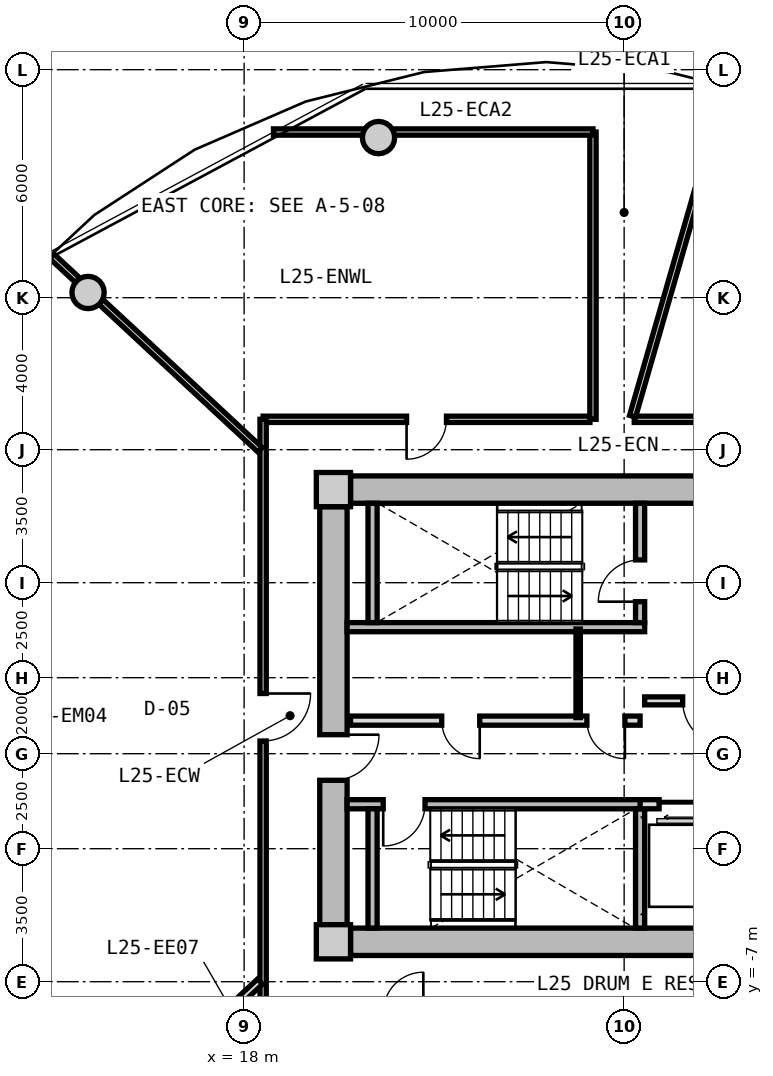
"""IFC4 building model, lengths in metres.
Left out: names, types, materials, properties, quantities, classifications, styles, units other than length and angle.
Written with IfcOpenShell. Run it as: python <this file> out.ifc"""

import sys

from ifc_helpers import new_model, si_unit, direction, frame, frame_2d, origin, origin_2d, place, context, subcontext, project, spatial, rectangle, circle, extrude, source, transform, mapped, element, fill, save


model = new_model("IFC4")
c1 = context("Model", 3, precision=1e-05, world=origin(), true_north=direction((0.0, 1.0)))
c2 = subcontext(c1, "Body", "Model", "MODEL_VIEW")
j1 = project(units=[si_unit("LENGTHUNIT", "METRE"), si_unit("PLANEANGLEUNIT", "RADIAN")], contexts=[c1])
p1 = place(None, origin())
s1 = spatial("IfcSite", under=j1, at=p1, CompositionType="ELEMENT")
p2 = place(p1, origin())
s2 = spatial("IfcBuilding", under=s1, at=p2, CompositionType="ELEMENT")
p3 = place(p2, frame((0.0, 0.0, 84.05)))
s3 = spatial("IfcBuildingStorey", under=s2, at=p3, CompositionType="ELEMENT", Elevation=84.05)
m1 = source(origin(), c2, "Body", "SweptSolid", [
    extrude(rectangle(XDim=0.9, YDim=0.9, at=origin_2d()), origin(), (0.0, 0.0, 1.0), 3.05),
])
for number, where, z_axis, x_axis in (
    (1, (20.35, -5.95, 0.0), (0.0, 0.0, 1.0), (1.0, 0.0, 0.0)),
    (2, (20.35, 5.95, 0.0), (0.0, 0.0, 1.0), (1.0, 0.0, 0.0)),
):
    element("IfcColumn", number, at=place(p3, frame(where, z_axis=z_axis, x_axis=x_axis)), inside=s3, PredefinedType="COLUMN", context=c2, shape_type="MappedRepresentation", body=[
        mapped(m1, transform((0.0, 0.0, 0.0), x_axis=(1.0, 0.0, 0.0), y_axis=(0.0, 1.0, 0.0), z_axis=(0.0, 0.0, 1.0), scale=1.0)),
    ])
m2 = source(origin(), c2, "Body", "SweptSolid", [
    extrude(rectangle(XDim=14.4, YDim=0.72, at=frame_2d((7.2, 0.0))), origin(), (0.0, 0.0, 1.0), 2.79),
])
for number, where, z_axis, x_axis in (
    (3, (20.8, 5.95, 0.0), (0.0, 0.0, 1.0), (1.0, 0.0, 0.0)),
    (4, (35.2, -5.95, 0.0), (0.0, 0.0, 1.0), (-1.0, 0.0, 0.0)),
):
    element("IfcWall", number, at=place(p3, frame(where, z_axis=z_axis, x_axis=x_axis)), inside=s3, PredefinedType="SHEAR", context=c2, shape_type="MappedRepresentation", body=[
        mapped(m2, transform((0.0, 0.0, 0.0), x_axis=(1.0, 0.0, 0.0), y_axis=(0.0, 1.0, 0.0), z_axis=(0.0, 0.0, 1.0), scale=1.0)),
    ])
m3 = source(origin(), c2, "Body", "SweptSolid", [
    extrude(rectangle(XDim=11.0, YDim=0.72, at=frame_2d((5.5, 0.0))), origin(), (0.0, 0.0, 1.0), 2.79),
])
p4 = place(p3, frame((20.35, -5.5, 0.0), z_axis=(0.0, 0.0, 1.0), x_axis=(0.0, 1.0, 0.0)))
e5 = element("IfcWall", 5, at=p4, inside=s3, PredefinedType="SHEAR", context=c2, shape_type="MappedRepresentation", body=[
    mapped(m3, transform((0.0, 0.0, 0.0), x_axis=(1.0, 0.0, 0.0), y_axis=(0.0, 1.0, 0.0), z_axis=(0.0, 0.0, 1.0), scale=1.0)),
])
p5 = place(p4, frame((3.8, 0.0, 0.0)))
e6 = element("IfcOpeningElement", 6, at=p5, cuts=e5, PredefinedType="OPENING", context=c2, shape_type="SweptSolid", body=[
    extrude(rectangle(XDim=1.2, YDim=2.15, at=frame_2d((0.6, 1.075))), frame((0.0, 0.37, 0.0), z_axis=(0.0, -1.0, 0.0), x_axis=(1.0, 0.0, 0.0)), (0.0, 0.0, 1.0), 0.74),
])
m4 = source(origin(), c2, "Body", "SweptSolid", [
    extrude(circle(Radius=0.425, at=origin_2d()), origin(), (0.0, 0.0, 1.0), 3.05),
])
for number, where, z_axis, x_axis in (
    (7, (21.537, 15.213, 0.0), (0.0, 0.0, 1.0), (1.0, 0.0, 0.0)),
    (8, (13.894, 11.137, 0.0), (0.0, 0.0, 1.0), (1.0, 0.0, 0.0)),
):
    element("IfcColumn", number, at=place(p3, frame(where, z_axis=z_axis, x_axis=x_axis)), inside=s3, PredefinedType="COLUMN", context=c2, shape_type="MappedRepresentation", body=[
        mapped(m4, transform((0.0, 0.0, 0.0), x_axis=(1.0, 0.0, 0.0), y_axis=(0.0, 1.0, 0.0), z_axis=(0.0, 0.0, 1.0), scale=1.0)),
    ])
m5 = source(origin(), c2, "Body", "SweptSolid", [
    extrude(rectangle(XDim=7.83, YDim=0.24, at=frame_2d((3.915, 0.0))), origin(), (0.0, 0.0, 1.0), 2.79),
])
p6 = place(p3, frame((20.71, 2.33, 0.0), z_axis=(0.0, 0.0, 1.0), x_axis=(1.0, 0.0, 0.0)))
e9 = element("IfcWall", 9, at=p6, inside=s3, PredefinedType="PARTITIONING", context=c2, shape_type="MappedRepresentation", body=[
    mapped(m5, transform((0.0, 0.0, 0.0), x_axis=(1.0, 0.0, 0.0), y_axis=(0.0, 1.0, 0.0), z_axis=(0.0, 0.0, 1.0), scale=1.0)),
])
m6 = source(origin(), c2, "Body", "SweptSolid", [
    extrude(rectangle(XDim=3.14, YDim=0.24, at=frame_2d((1.57, 0.0))), origin(), (0.0, 0.0, 1.0), 2.79),
])
p7 = place(p3, frame((21.38, 2.45, 0.0), z_axis=(0.0, 0.0, 1.0), x_axis=(0.0, 1.0, 0.0)))
e10 = element("IfcWall", 10, at=p7, inside=s3, PredefinedType="PARTITIONING", context=c2, shape_type="MappedRepresentation", body=[
    mapped(m6, transform((0.0, 0.0, 0.0), x_axis=(1.0, 0.0, 0.0), y_axis=(0.0, 1.0, 0.0), z_axis=(0.0, 0.0, 1.0), scale=1.0)),
])
p8 = place(p3, frame((28.42, 2.45, 0.0), z_axis=(0.0, 0.0, 1.0), x_axis=(0.0, 1.0, 0.0)))
e11 = element("IfcWall", 11, at=p8, inside=s3, PredefinedType="PARTITIONING", context=c2, shape_type="MappedRepresentation", body=[
    mapped(m6, transform((0.0, 0.0, 0.0), x_axis=(1.0, 0.0, 0.0), y_axis=(0.0, 1.0, 0.0), z_axis=(0.0, 0.0, 1.0), scale=1.0)),
])
p9 = place(p8, frame((0.55, 0.0, 0.0)))
e12 = element("IfcOpeningElement", 12, at=p9, cuts=e11, PredefinedType="OPENING", context=c2, shape_type="SweptSolid", body=[
    extrude(rectangle(XDim=1.1, YDim=2.15, at=frame_2d((0.55, 1.075))), frame((0.0, 0.13, 0.0), z_axis=(0.0, -1.0, 0.0), x_axis=(1.0, 0.0, 0.0)), (0.0, 0.0, 1.0), 0.26),
])
p10 = place(p3, frame((20.71, -2.33, 0.0), z_axis=(0.0, 0.0, 1.0), x_axis=(1.0, 0.0, 0.0)))
e13 = element("IfcWall", 13, at=p10, inside=s3, PredefinedType="PARTITIONING", context=c2, shape_type="MappedRepresentation", body=[
    mapped(m5, transform((0.0, 0.0, 0.0), x_axis=(1.0, 0.0, 0.0), y_axis=(0.0, 1.0, 0.0), z_axis=(0.0, 0.0, 1.0), scale=1.0)),
])
p11 = place(p10, frame((0.95, 0.0, 0.0)))
e14 = element("IfcOpeningElement", 14, at=p11, cuts=e13, PredefinedType="OPENING", context=c2, shape_type="SweptSolid", body=[
    extrude(rectangle(XDim=1.1, YDim=2.15, at=frame_2d((0.55, 1.075))), frame((0.0, 0.13, 0.0), z_axis=(0.0, -1.0, 0.0), x_axis=(1.0, 0.0, 0.0)), (0.0, 0.0, 1.0), 0.26),
])
for number, where, z_axis, x_axis in (
    (15, (21.38, -5.59, 0.0), (0.0, 0.0, 1.0), (0.0, 1.0, 0.0)),
    (16, (28.42, -5.59, 0.0), (0.0, 0.0, 1.0), (0.0, 1.0, 0.0)),
):
    element("IfcWall", number, at=place(p3, frame(where, z_axis=z_axis, x_axis=x_axis)), inside=s3, PredefinedType="PARTITIONING", context=c2, shape_type="MappedRepresentation", body=[
        mapped(m6, transform((0.0, 0.0, 0.0), x_axis=(1.0, 0.0, 0.0), y_axis=(0.0, 1.0, 0.0), z_axis=(0.0, 0.0, 1.0), scale=1.0)),
    ])
m7 = source(origin(), c2, "Body", "SweptSolid", [
    extrude(rectangle(XDim=6.66, YDim=0.21, at=frame_2d((3.33, 0.0))), origin(), (0.0, 0.0, 1.0), 2.775),
])
p12 = place(p3, frame((28.54, 0.39, 0.0), z_axis=(0.0, 0.0, 1.0), x_axis=(1.0, 0.0, 0.0)))
e17 = element("IfcWall", 17, at=p12, inside=s3, PredefinedType="PARTITIONING", context=c2, shape_type="MappedRepresentation", body=[
    mapped(m7, transform((0.0, 0.0, 0.0), x_axis=(1.0, 0.0, 0.0), y_axis=(0.0, 1.0, 0.0), z_axis=(0.0, 0.0, 1.0), scale=1.0)),
])
p13 = place(p12, frame((1.0, 0.0, 0.0)))
e18 = element("IfcOpeningElement", 18, at=p13, cuts=e17, PredefinedType="OPENING", context=c2, shape_type="SweptSolid", body=[
    extrude(rectangle(XDim=1.2, YDim=2.15, at=frame_2d((0.6, 1.075))), frame((0.0, 0.115, 0.0), z_axis=(0.0, -1.0, 0.0), x_axis=(1.0, 0.0, 0.0)), (0.0, 0.0, 1.0), 0.23),
])
m8 = source(origin(), c2, "Body", "SweptSolid", [
    extrude(rectangle(XDim=7.62, YDim=0.24, at=frame_2d((3.81, 0.0))), origin(), (0.0, 0.0, 1.0), 2.775),
])
p14 = place(p3, frame((20.8, -0.13, 0.0), z_axis=(0.0, 0.0, 1.0), x_axis=(1.0, 0.0, 0.0)))
e19 = element("IfcWall", 19, at=p14, inside=s3, PredefinedType="PARTITIONING", context=c2, shape_type="MappedRepresentation", body=[
    mapped(m8, transform((0.0, 0.0, 0.0), x_axis=(1.0, 0.0, 0.0), y_axis=(0.0, 1.0, 0.0), z_axis=(0.0, 0.0, 1.0), scale=1.0)),
])
p15 = place(p14, frame((6.22, 0.0, 0.0)))
e20 = element("IfcOpeningElement", 20, at=p15, cuts=e19, PredefinedType="OPENING", context=c2, shape_type="SweptSolid", body=[
    extrude(rectangle(XDim=1.0, YDim=2.1, at=frame_2d((0.5, 1.05))), frame((0.0, 0.13, 0.0), z_axis=(0.0, -1.0, 0.0), x_axis=(1.0, 0.0, 0.0)), (0.0, 0.0, 1.0), 0.26),
])
p16 = place(p14, frame((2.4, 0.0, 0.0)))
e21 = element("IfcOpeningElement", 21, at=p16, cuts=e19, PredefinedType="OPENING", context=c2, shape_type="SweptSolid", body=[
    extrude(rectangle(XDim=1.0, YDim=2.1, at=frame_2d((0.5, 1.05))), frame((0.0, 0.13, 0.0), z_axis=(0.0, -1.0, 0.0), x_axis=(1.0, 0.0, 0.0)), (0.0, 0.0, 1.0), 0.26),
])
m9 = source(origin(), c2, "Body", "SweptSolid", [
    extrude(rectangle(XDim=2.33, YDim=0.115, at=frame_2d((1.165, 0.0))), origin(), (0.0, 0.0, 1.0), 2.775),
])
p17 = place(p3, frame((26.79, -0.05, 0.0), z_axis=(0.0, 0.0, 1.0), x_axis=(0.0, 1.0, 0.0)))
e22 = element("IfcWall", 22, at=p17, inside=s3, PredefinedType="PARTITIONING", context=c2, shape_type="MappedRepresentation", body=[
    mapped(m9, transform((0.0, 0.0, 0.0), x_axis=(1.0, 0.0, 0.0), y_axis=(0.0, 1.0, 0.0), z_axis=(0.0, 0.0, 1.0), scale=1.0)),
])
m10 = source(origin(), c2, "Body", "SweptSolid", [
    extrude(rectangle(XDim=4.13, YDim=0.24, at=frame_2d((2.065, 0.0))), origin(), (0.0, 0.0, 1.0), 2.775),
])
p18 = place(p3, frame((28.42, -2.33, 0.0), z_axis=(0.0, 0.0, 1.0), x_axis=(1.0, 0.0, 0.0)))
e23 = element("IfcWall", 23, at=p18, inside=s3, PredefinedType="PARTITIONING", context=c2, shape_type="MappedRepresentation", body=[
    mapped(m10, transform((0.0, 0.0, 0.0), x_axis=(1.0, 0.0, 0.0), y_axis=(0.0, 1.0, 0.0), z_axis=(0.0, 0.0, 1.0), scale=1.0)),
])
p19 = place(p18, frame((0.5, 0.0, 0.0)))
e24 = element("IfcOpeningElement", 24, at=p19, cuts=e23, PredefinedType="OPENING", context=c2, shape_type="SweptSolid", body=[
    extrude(rectangle(XDim=1.1, YDim=2.2, at=frame_2d((0.55, 1.1))), frame((0.0, 0.13, 0.0), z_axis=(0.0, -1.0, 0.0), x_axis=(1.0, 0.0, 0.0)), (0.0, 0.0, 1.0), 0.26),
])
m11 = source(origin(), c2, "Body", "SweptSolid", [
    extrude(rectangle(XDim=8.6, YDim=0.165, at=frame_2d((4.3, 0.0))), origin(), (0.0, 0.0, 1.0), 2.775),
])
p20 = place(p3, frame((18.5, 7.8, 0.0), z_axis=(0.0, 0.0, 1.0), x_axis=(1.0, 0.0, 0.0)))
e25 = element("IfcWall", 25, at=p20, inside=s3, PredefinedType="PARTITIONING", context=c2, shape_type="MappedRepresentation", body=[
    mapped(m11, transform((0.0, 0.0, 0.0), x_axis=(1.0, 0.0, 0.0), y_axis=(0.0, 1.0, 0.0), z_axis=(0.0, 0.0, 1.0), scale=1.0)),
])
p21 = place(p20, frame((3.775, 0.0, 0.0)))
e26 = element("IfcOpeningElement", 26, at=p21, cuts=e25, PredefinedType="OPENING", context=c2, shape_type="SweptSolid", body=[
    extrude(rectangle(XDim=1.05, YDim=2.15, at=frame_2d((0.525, 1.075))), frame((0.0, 0.093, 0.0), z_axis=(0.0, -1.0, 0.0), x_axis=(1.0, 0.0, 0.0)), (0.0, 0.0, 1.0), 0.185),
])
m12 = source(origin(), c2, "Body", "SweptSolid", [
    extrude(rectangle(XDim=9.234, YDim=0.165, at=frame_2d((4.617, 0.0))), origin(), (0.0, 0.0, 1.0), 2.775),
])
p22 = place(p3, frame((28.266, 7.8, 0.0), z_axis=(0.0, 0.0, 1.0), x_axis=(1.0, 0.0, 0.0)))
e27 = element("IfcWall", 27, at=p22, inside=s3, PredefinedType="PARTITIONING", context=c2, shape_type="MappedRepresentation", body=[
    mapped(m12, transform((0.0, 0.0, 0.0), x_axis=(1.0, 0.0, 0.0), y_axis=(0.0, 1.0, 0.0), z_axis=(0.0, 0.0, 1.0), scale=1.0)),
])
p23 = place(p22, frame((4.092, 0.0, 0.0)))
e28 = element("IfcOpeningElement", 28, at=p23, cuts=e27, PredefinedType="OPENING", context=c2, shape_type="SweptSolid", body=[
    extrude(rectangle(XDim=1.05, YDim=2.15, at=frame_2d((0.525, 1.075))), frame((0.0, 0.093, 0.0), z_axis=(0.0, -1.0, 0.0), x_axis=(1.0, 0.0, 0.0)), (0.0, 0.0, 1.0), 0.185),
])
m13 = source(origin(), c2, "Body", "SweptSolid", [
    extrude(rectangle(XDim=15.6, YDim=0.165, at=frame_2d((7.8, 0.0))), origin(), (0.0, 0.0, 1.0), 2.775),
])
p24 = place(p3, frame((18.5, -7.8, 0.0), z_axis=(0.0, 0.0, 1.0), x_axis=(0.0, 1.0, 0.0)))
e29 = element("IfcWall", 29, at=p24, inside=s3, PredefinedType="PARTITIONING", context=c2, shape_type="MappedRepresentation", body=[
    mapped(m13, transform((0.0, 0.0, 0.0), x_axis=(1.0, 0.0, 0.0), y_axis=(0.0, 1.0, 0.0), z_axis=(0.0, 0.0, 1.0), scale=1.0)),
])
p25 = place(p24, frame((7.134, 0.0, 0.0)))
e30 = element("IfcOpeningElement", 30, at=p25, cuts=e29, PredefinedType="OPENING", context=c2, shape_type="SweptSolid", body=[
    extrude(rectangle(XDim=1.25, YDim=2.2, at=frame_2d((0.625, 1.1))), frame((0.0, 0.093, 0.0), z_axis=(0.0, -1.0, 0.0), x_axis=(1.0, 0.0, 0.0)), (0.0, 0.0, 1.0), 0.185),
])
m14 = source(origin(), c2, "Body", "SweptSolid", [
    extrude(rectangle(XDim=8.989, YDim=0.165, at=frame_2d((4.495, 0.0))), origin(), (0.0, 0.0, 1.0), 2.275),
])
p26 = place(p3, frame((28.222, 7.88, 0.0), z_axis=(0.0, 0.0, 1.0), x_axis=(0.27702323008, 0.960863221274, 0.0)))
e31 = element("IfcWall", 31, at=p26, inside=s3, PredefinedType="PARTITIONING", context=c2, shape_type="MappedRepresentation", body=[
    mapped(m14, transform((0.0, 0.0, 0.0), x_axis=(1.0, 0.0, 0.0), y_axis=(0.0, 1.0, 0.0), z_axis=(0.0, 0.0, 1.0), scale=1.0)),
])
m15 = source(origin(), c2, "Body", "SweptSolid", [
    extrude(rectangle(XDim=7.482, YDim=0.165, at=frame_2d((3.741, 0.0))), origin(), (0.0, 0.0, 1.0), 2.275),
])
p27 = place(p3, frame((18.42, 6.998, 0.0), z_axis=(0.0, 0.0, 1.0), x_axis=(-0.732508698043, 0.680757671489, 0.0)))
e32 = element("IfcWall", 32, at=p27, inside=s3, PredefinedType="PARTITIONING", context=c2, shape_type="MappedRepresentation", body=[
    mapped(m15, transform((0.0, 0.0, 0.0), x_axis=(1.0, 0.0, 0.0), y_axis=(0.0, 1.0, 0.0), z_axis=(0.0, 0.0, 1.0), scale=1.0)),
])
m16 = source(origin(), c2, "Body", "SweptSolid", [
    extrude(rectangle(XDim=7.56, YDim=0.165, at=frame_2d((3.78, 0.0))), origin(), (0.0, 0.0, 1.0), 2.775),
])
p28 = place(p3, frame((27.18, 7.8, 0.0), z_axis=(0.0, 0.0, 1.0), x_axis=(0.0, 1.0, 0.0)))
e33 = element("IfcWall", 33, at=p28, inside=s3, PredefinedType="PARTITIONING", context=c2, shape_type="MappedRepresentation", body=[
    mapped(m16, transform((0.0, 0.0, 0.0), x_axis=(1.0, 0.0, 0.0), y_axis=(0.0, 1.0, 0.0), z_axis=(0.0, 0.0, 1.0), scale=1.0)),
])
m17 = source(origin(), c2, "Body", "SweptSolid", [
    extrude(rectangle(XDim=8.407, YDim=0.165, at=frame_2d((4.204, 0.0))), origin(), (0.0, 0.0, 1.0), 2.275),
])
p29 = place(p3, frame((18.773, 15.36, 0.0), z_axis=(0.0, 0.0, 1.0), x_axis=(1.0, 0.0, 0.0)))
e34 = element("IfcWall", 34, at=p29, inside=s3, PredefinedType="PARTITIONING", context=c2, shape_type="MappedRepresentation", body=[
    mapped(m17, transform((0.0, 0.0, 0.0), x_axis=(1.0, 0.0, 0.0), y_axis=(0.0, 1.0, 0.0), z_axis=(0.0, 0.0, 1.0), scale=1.0)),
])
m18 = source(origin(), c2, "Body", "SweptSolid", [
    extrude(rectangle(XDim=7.482, YDim=0.19, at=frame_2d((3.741, 0.0))), origin(), (0.0, 0.0, 1.0), 2.275),
])
p30 = place(p3, frame((18.42, -6.998, 0.0), z_axis=(0.0, 0.0, 1.0), x_axis=(-0.732508698043, -0.680757671489, 0.0)))
e35 = element("IfcWall", 35, at=p30, inside=s3, PredefinedType="PARTITIONING", context=c2, shape_type="MappedRepresentation", body=[
    mapped(m18, transform((0.0, 0.0, 0.0), x_axis=(1.0, 0.0, 0.0), y_axis=(0.0, 1.0, 0.0), z_axis=(0.0, 0.0, 1.0), scale=1.0)),
])
m19 = source(origin(), c2, "Body", "SweptSolid", [
    extrude(rectangle(XDim=1.1, YDim=2.15, at=frame_2d((0.55, 1.075))), frame((0.0, 0.025, 0.0), z_axis=(0.0, -1.0, 0.0), x_axis=(1.0, 0.0, 0.0)), (0.0, 0.0, 1.0), 0.05),
])
p31 = place(p9, origin())
e36 = element("IfcDoor", 36, at=p31, inside=s3, OperationType="SINGLE_SWING_LEFT", PredefinedType="DOOR", context=c2, shape_type="MappedRepresentation", body=[
    mapped(m19, transform((0.0, 0.0, 0.0), x_axis=(1.0, 0.0, 0.0), y_axis=(0.0, 1.0, 0.0), z_axis=(0.0, 0.0, 1.0), scale=1.0)),
])
fill(e12, e36)
p32 = place(p11, frame((1.1, 0.0, 0.0), z_axis=(0.0, 0.0, 1.0), x_axis=(-1.0, 0.0, 0.0)))
e37 = element("IfcDoor", 37, at=p32, inside=s3, OperationType="SINGLE_SWING_RIGHT", PredefinedType="DOOR", context=c2, shape_type="MappedRepresentation", body=[
    mapped(m19, transform((0.0, 0.0, 0.0), x_axis=(1.0, 0.0, 0.0), y_axis=(0.0, 1.0, 0.0), z_axis=(0.0, 0.0, 1.0), scale=1.0)),
])
fill(e14, e37)
m20 = source(origin(), c2, "Body", "SweptSolid", [
    extrude(rectangle(XDim=1.2, YDim=2.15, at=frame_2d((0.6, 1.075))), frame((0.0, 0.025, 0.0), z_axis=(0.0, -1.0, 0.0), x_axis=(1.0, 0.0, 0.0)), (0.0, 0.0, 1.0), 0.05),
])
p33 = place(p13, frame((1.2, 0.0, 0.0), z_axis=(0.0, 0.0, 1.0), x_axis=(-1.0, 0.0, 0.0)))
e38 = element("IfcDoor", 38, at=p33, inside=s3, OperationType="SINGLE_SWING_LEFT", PredefinedType="DOOR", context=c2, shape_type="MappedRepresentation", body=[
    mapped(m20, transform((0.0, 0.0, 0.0), x_axis=(1.0, 0.0, 0.0), y_axis=(0.0, 1.0, 0.0), z_axis=(0.0, 0.0, 1.0), scale=1.0)),
])
fill(e18, e38)
p34 = place(p5, frame((1.2, 0.0, 0.0), z_axis=(0.0, 0.0, 1.0), x_axis=(-1.0, 0.0, 0.0)))
e39 = element("IfcDoor", 39, at=p34, inside=s3, OperationType="SINGLE_SWING_LEFT", PredefinedType="DOOR", context=c2, shape_type="MappedRepresentation", body=[
    mapped(m20, transform((0.0, 0.0, 0.0), x_axis=(1.0, 0.0, 0.0), y_axis=(0.0, 1.0, 0.0), z_axis=(0.0, 0.0, 1.0), scale=1.0)),
])
fill(e6, e39)
m21 = source(origin(), c2, "Body", "SweptSolid", [
    extrude(rectangle(XDim=1.0, YDim=2.1, at=frame_2d((0.5, 1.05))), frame((0.0, 0.025, 0.0), z_axis=(0.0, -1.0, 0.0), x_axis=(1.0, 0.0, 0.0)), (0.0, 0.0, 1.0), 0.05),
])
p35 = place(p15, frame((1.0, 0.0, 0.0), z_axis=(0.0, 0.0, 1.0), x_axis=(-1.0, 0.0, 0.0)))
e40 = element("IfcDoor", 40, at=p35, inside=s3, OperationType="SINGLE_SWING_LEFT", PredefinedType="DOOR", context=c2, shape_type="MappedRepresentation", body=[
    mapped(m21, transform((0.0, 0.0, 0.0), x_axis=(1.0, 0.0, 0.0), y_axis=(0.0, 1.0, 0.0), z_axis=(0.0, 0.0, 1.0), scale=1.0)),
])
fill(e20, e40)
p36 = place(p16, frame((1.0, 0.0, 0.0), z_axis=(0.0, 0.0, 1.0), x_axis=(-1.0, 0.0, 0.0)))
e41 = element("IfcDoor", 41, at=p36, inside=s3, OperationType="SINGLE_SWING_LEFT", PredefinedType="DOOR", context=c2, shape_type="MappedRepresentation", body=[
    mapped(m21, transform((0.0, 0.0, 0.0), x_axis=(1.0, 0.0, 0.0), y_axis=(0.0, 1.0, 0.0), z_axis=(0.0, 0.0, 1.0), scale=1.0)),
])
fill(e21, e41)
m22 = source(origin(), c2, "Body", "SweptSolid", [
    extrude(rectangle(XDim=1.1, YDim=2.2, at=frame_2d((0.55, 1.1))), frame((0.0, 0.025, 0.0), z_axis=(0.0, -1.0, 0.0), x_axis=(1.0, 0.0, 0.0)), (0.0, 0.0, 1.0), 0.05),
])
p37 = place(p19, frame((1.1, 0.0, 0.0), z_axis=(0.0, 0.0, 1.0), x_axis=(-1.0, 0.0, 0.0)))
e42 = element("IfcDoor", 42, at=p37, inside=s3, OperationType="SLIDING_TO_LEFT", PredefinedType="DOOR", context=c2, shape_type="MappedRepresentation", body=[
    mapped(m22, transform((0.0, 0.0, 0.0), x_axis=(1.0, 0.0, 0.0), y_axis=(0.0, 1.0, 0.0), z_axis=(0.0, 0.0, 1.0), scale=1.0)),
])
fill(e24, e42)
m23 = source(origin(), c2, "Body", "SweptSolid", [
    extrude(rectangle(XDim=1.05, YDim=2.15, at=frame_2d((0.525, 1.075))), frame((0.0, 0.025, 0.0), z_axis=(0.0, -1.0, 0.0), x_axis=(1.0, 0.0, 0.0)), (0.0, 0.0, 1.0), 0.05),
])
p38 = place(p21, frame((1.05, 0.0, 0.0), z_axis=(0.0, 0.0, 1.0), x_axis=(-1.0, 0.0, 0.0)))
e43 = element("IfcDoor", 43, at=p38, inside=s3, OperationType="SINGLE_SWING_RIGHT", PredefinedType="DOOR", context=c2, shape_type="MappedRepresentation", body=[
    mapped(m23, transform((0.0, 0.0, 0.0), x_axis=(1.0, 0.0, 0.0), y_axis=(0.0, 1.0, 0.0), z_axis=(0.0, 0.0, 1.0), scale=1.0)),
])
fill(e26, e43)
m24 = source(origin(), c2, "Body", "SweptSolid", [
    extrude(rectangle(XDim=1.25, YDim=2.2, at=frame_2d((0.625, 1.1))), frame((0.0, 0.025, 0.0), z_axis=(0.0, -1.0, 0.0), x_axis=(1.0, 0.0, 0.0)), (0.0, 0.0, 1.0), 0.05),
])
p39 = place(p25, frame((1.25, 0.0, 0.0), z_axis=(0.0, 0.0, 1.0), x_axis=(-1.0, 0.0, 0.0)))
e44 = element("IfcDoor", 44, at=p39, inside=s3, OperationType="SINGLE_SWING_LEFT", PredefinedType="DOOR", context=c2, shape_type="MappedRepresentation", body=[
    mapped(m24, transform((0.0, 0.0, 0.0), x_axis=(1.0, 0.0, 0.0), y_axis=(0.0, 1.0, 0.0), z_axis=(0.0, 0.0, 1.0), scale=1.0)),
])
fill(e30, e44)
save(model, sys.argv[1])
